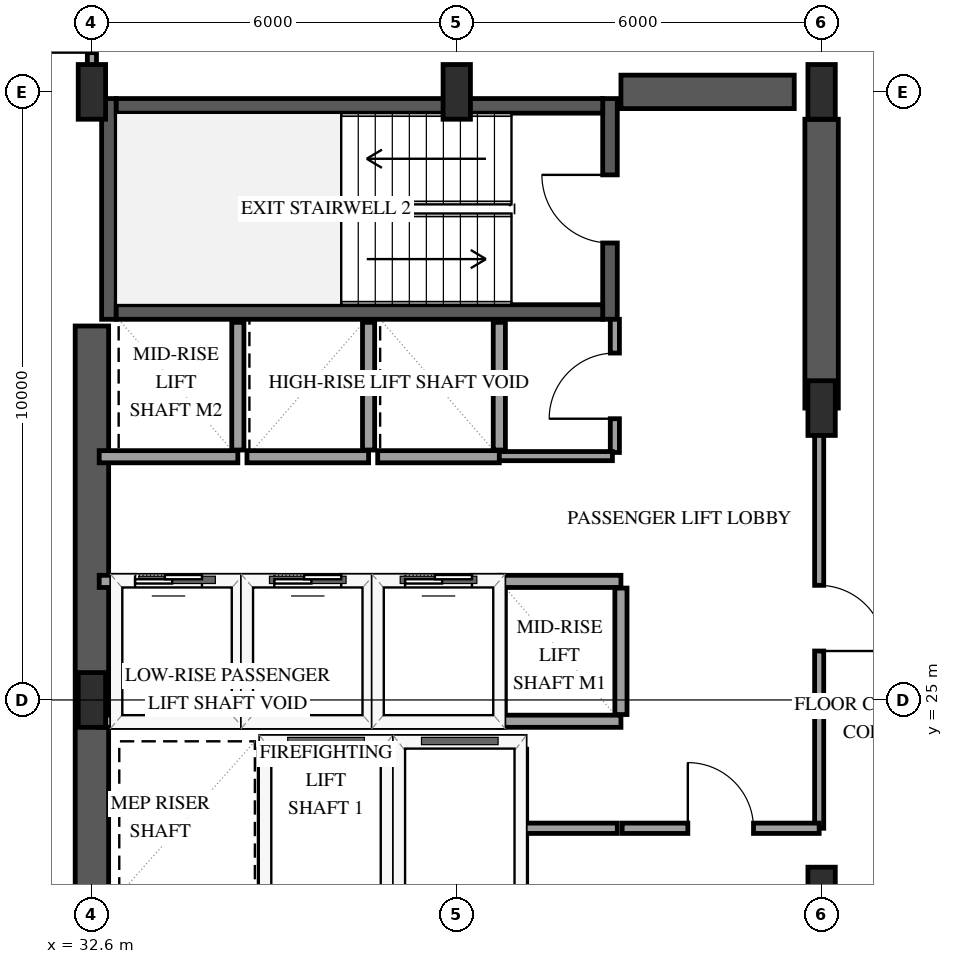
"""IFC4 building model, lengths in metres.
Left out: names, types, materials, properties, quantities, classifications, styles, units other than length and angle.
Written with IfcOpenShell. Run it as: python <this file> out.ifc"""

import sys

from ifc_helpers import new_model, si_unit, direction, frame, frame_2d, origin, origin_2d, place, context, subcontext, project, spatial, rectangle, extrude, element, fill, save


model = new_model("IFC4")
c1 = context("Model", 3, precision=1e-05, world=origin(), true_north=direction((0.0, 1.0)))
c2 = subcontext(c1, "Body", "Model", "MODEL_VIEW")
j1 = project(units=[si_unit("LENGTHUNIT", "METRE"), si_unit("PLANEANGLEUNIT", "RADIAN")], contexts=[c1])
p1 = place(None, origin())
s1 = spatial("IfcSite", under=j1, at=p1, CompositionType="ELEMENT")
p2 = place(p1, origin())
s2 = spatial("IfcBuilding", under=s1, at=p2, CompositionType="ELEMENT")
p3 = place(p2, frame((0.0, 0.0, 87.4)))
s3 = spatial("IfcBuildingStorey", under=s2, at=p3, CompositionType="ELEMENT", Elevation=87.4)
p4 = place(p3, frame((32.88, 31.26, 0.0), z_axis=(0.0, 0.0, 1.0), x_axis=(0.0, 1.0, 0.0)))
e1 = element("IfcWall", 1, at=p4, inside=s3, PredefinedType="SHEAR", context=c2, shape_type="SweptSolid", body=[
    extrude(rectangle(XDim=3.63, YDim=0.24, at=frame_2d((1.815, 0.0))), origin(), (0.0, 0.0, 1.0), 3.9),
])
p5 = place(p3, frame((41.12, 31.26, 0.0), z_axis=(0.0, 0.0, 1.0), x_axis=(0.0, 1.0, 0.0)))
e2 = element("IfcWall", 2, at=p5, inside=s3, PredefinedType="SHEAR", context=c2, shape_type="SweptSolid", body=[
    extrude(rectangle(XDim=3.63, YDim=0.24, at=frame_2d((1.815, 0.0))), origin(), (0.0, 0.0, 1.0), 3.9),
])
p6 = place(p5, frame((1.255, 0.0, 0.0)))
e3 = element("IfcOpeningElement", 3, at=p6, cuts=e2, PredefinedType="OPENING", context=c2, shape_type="SweptSolid", body=[
    extrude(rectangle(XDim=1.12, YDim=2.15, at=frame_2d((0.56, 1.075))), frame((0.0, 0.13, 0.0), z_axis=(0.0, -1.0, 0.0), x_axis=(1.0, 0.0, 0.0)), (0.0, 0.0, 1.0), 0.26),
])
for number, where, z_axis, x_axis in (
    (4, (33.0, 31.38, 0.0), (0.0, 0.0, 1.0), (1.0, 0.0, 0.0)),
    (5, (33.0, 34.77, 0.0), (0.0, 0.0, 1.0), (1.0, 0.0, 0.0)),
):
    element("IfcWall", number, at=place(p3, frame(where, z_axis=z_axis, x_axis=x_axis)), inside=s3, PredefinedType="SHEAR", context=c2, shape_type="SweptSolid", body=[
        extrude(rectangle(XDim=8.0, YDim=0.24, at=frame_2d((4.0, 0.0))), origin(), (0.0, 0.0, 1.0), 3.9),
    ])
p7 = place(p3, frame((32.6, 18.85, 0.0), z_axis=(0.0, 0.0, 1.0), x_axis=(0.0, 1.0, 0.0)))
e6 = element("IfcWall", 6, at=p7, inside=s3, PredefinedType="SHEAR", context=c2, shape_type="SweptSolid", body=[
    extrude(rectangle(XDim=12.3, YDim=0.55, at=frame_2d((6.15, 0.0))), origin(), (0.0, 0.0, 1.0), 3.9),
])
p8 = place(p3, frame((41.3, 35.0, 0.0), z_axis=(0.0, 0.0, 1.0), x_axis=(1.0, 0.0, 0.0)))
e7 = element("IfcWall", 7, at=p8, inside=s3, PredefinedType="SHEAR", context=c2, shape_type="SweptSolid", body=[
    extrude(rectangle(XDim=2.85, YDim=0.55, at=frame_2d((1.425, 0.0))), origin(), (0.0, 0.0, 1.0), 3.9),
])
p9 = place(p3, frame((44.6, 29.8, 0.0), z_axis=(0.0, 0.0, 1.0), x_axis=(0.0, 1.0, 0.0)))
e8 = element("IfcWall", 8, at=p9, inside=s3, PredefinedType="SHEAR", context=c2, shape_type="SweptSolid", body=[
    extrude(rectangle(XDim=4.75, YDim=0.55, at=frame_2d((2.375, 0.0))), origin(), (0.0, 0.0, 1.0), 3.9),
])
for number, where, z_axis, x_axis in (
    (9, (32.6, 25.0, -0.3), (0.0, 0.0, 1.0), (1.0, 0.0, 0.0)),
    (10, (32.6, 35.0, -0.3), (0.0, 0.0, 1.0), (1.0, 0.0, 0.0)),
    (11, (38.6, 35.0, -0.3), (0.0, 0.0, 1.0), (1.0, 0.0, 0.0)),
    (12, (44.6, 21.8, -0.3), (0.0, 0.0, 1.0), (1.0, 0.0, 0.0)),
    (13, (44.6, 29.8, -0.3), (0.0, 0.0, 1.0), (1.0, 0.0, 0.0)),
    (14, (44.6, 35.0, -0.3), (0.0, 0.0, 1.0), (1.0, 0.0, 0.0)),
):
    element("IfcColumn", number, at=place(p3, frame(where, z_axis=z_axis, x_axis=x_axis)), inside=s3, PredefinedType="PILASTER", context=c2, shape_type="SweptSolid", body=[
        extrude(rectangle(XDim=0.45, YDim=0.9, at=origin_2d()), origin(), (0.0, 0.0, 1.0), 4.2),
    ])
p10 = place(p3, frame((35.45, 24.3, 0.0), z_axis=(0.0, 0.0, 1.0), x_axis=(1.0, 0.0, 0.0)))
e15 = element("IfcWall", 15, at=p10, inside=s3, PredefinedType="SOLIDWALL", context=c2, shape_type="SweptSolid", body=[
    extrude(rectangle(XDim=2.0, YDim=0.2, at=frame_2d((1.0, 0.0))), origin(), (0.0, 0.0, 1.0), 3.6),
])
for number, where, z_axis, x_axis in (
    (16, (35.45, 21.81, 0.0), (0.0, 0.0, 1.0), (0.0, 1.0, 0.0)),
    (17, (37.45, 21.81, 0.0), (0.0, 0.0, 1.0), (0.0, 1.0, 0.0)),
):
    element("IfcWall", number, at=place(p3, frame(where, z_axis=z_axis, x_axis=x_axis)), inside=s3, PredefinedType="SOLIDWALL", context=c2, shape_type="SweptSolid", body=[
        extrude(rectangle(XDim=2.38, YDim=0.2, at=frame_2d((1.19, 0.0))), origin(), (0.0, 0.0, 1.0), 3.6),
    ])
p11 = place(p3, frame((37.65, 24.3, 0.0), z_axis=(0.0, 0.0, 1.0), x_axis=(1.0, 0.0, 0.0)))
e18 = element("IfcWall", 18, at=p11, inside=s3, PredefinedType="SOLIDWALL", context=c2, shape_type="SweptSolid", body=[
    extrude(rectangle(XDim=2.0, YDim=0.2, at=frame_2d((1.0, 0.0))), origin(), (0.0, 0.0, 1.0), 3.6),
])
p12 = place(p3, frame((39.65, 21.81, 0.0), z_axis=(0.0, 0.0, 1.0), x_axis=(0.0, 1.0, 0.0)))
e19 = element("IfcWall", 19, at=p12, inside=s3, PredefinedType="SOLIDWALL", context=c2, shape_type="SweptSolid", body=[
    extrude(rectangle(XDim=2.38, YDim=0.2, at=frame_2d((1.19, 0.0))), origin(), (0.0, 0.0, 1.0), 3.6),
])
p13 = place(p3, frame((32.72, 24.65, 0.0), z_axis=(0.0, 0.0, 1.0), x_axis=(1.0, 0.0, 0.0)))
e20 = element("IfcWall", 20, at=p13, inside=s3, PredefinedType="SOLIDWALL", context=c2, shape_type="SweptSolid", body=[
    extrude(rectangle(XDim=2.28, YDim=0.2, at=frame_2d((1.14, 0.0))), origin(), (0.0, 0.0, 1.0), 3.6),
])
p14 = place(p3, frame((32.72, 26.95, 0.0), z_axis=(0.0, 0.0, 1.0), x_axis=(1.0, 0.0, 0.0)))
e21 = element("IfcWall", 21, at=p14, inside=s3, PredefinedType="SOLIDWALL", context=c2, shape_type="SweptSolid", body=[
    extrude(rectangle(XDim=2.28, YDim=0.2, at=frame_2d((1.14, 0.0))), origin(), (0.0, 0.0, 1.0), 2.974),
])
p15 = place(p14, frame((0.59, 0.0, 0.0)))
e22 = element("IfcOpeningElement", 22, at=p15, cuts=e21, PredefinedType="OPENING", context=c2, shape_type="SweptSolid", body=[
    extrude(rectangle(XDim=1.1, YDim=2.15, at=frame_2d((0.55, 1.075))), frame((0.0, 0.11, 0.0), z_axis=(0.0, -1.0, 0.0), x_axis=(1.0, 0.0, 0.0)), (0.0, 0.0, 1.0), 0.22),
])
p16 = place(p3, frame((35.0, 24.76, 0.0), z_axis=(0.0, 0.0, 1.0), x_axis=(0.0, 1.0, 0.0)))
e23 = element("IfcWall", 23, at=p16, inside=s3, PredefinedType="SOLIDWALL", context=c2, shape_type="SweptSolid", body=[
    extrude(rectangle(XDim=2.08, YDim=0.2, at=frame_2d((1.04, 0.0))), origin(), (0.0, 0.0, 1.0), 3.6),
])
p17 = place(p3, frame((35.15, 24.65, 0.0), z_axis=(0.0, 0.0, 1.0), x_axis=(1.0, 0.0, 0.0)))
e24 = element("IfcWall", 24, at=p17, inside=s3, PredefinedType="SOLIDWALL", context=c2, shape_type="SweptSolid", body=[
    extrude(rectangle(XDim=2.0, YDim=0.2, at=frame_2d((1.0, 0.0))), origin(), (0.0, 0.0, 1.0), 3.6),
])
p18 = place(p3, frame((35.15, 26.95, 0.0), z_axis=(0.0, 0.0, 1.0), x_axis=(1.0, 0.0, 0.0)))
e25 = element("IfcWall", 25, at=p18, inside=s3, PredefinedType="SOLIDWALL", context=c2, shape_type="SweptSolid", body=[
    extrude(rectangle(XDim=2.0, YDim=0.2, at=frame_2d((1.0, 0.0))), origin(), (0.0, 0.0, 1.0), 2.974),
])
p19 = place(p18, frame((0.45, 0.0, 0.0)))
e26 = element("IfcOpeningElement", 26, at=p19, cuts=e25, PredefinedType="OPENING", context=c2, shape_type="SweptSolid", body=[
    extrude(rectangle(XDim=1.1, YDim=2.15, at=frame_2d((0.55, 1.075))), frame((0.0, 0.11, 0.0), z_axis=(0.0, -1.0, 0.0), x_axis=(1.0, 0.0, 0.0)), (0.0, 0.0, 1.0), 0.22),
])
p20 = place(p3, frame((37.15, 24.76, 0.0), z_axis=(0.0, 0.0, 1.0), x_axis=(0.0, 1.0, 0.0)))
e27 = element("IfcWall", 27, at=p20, inside=s3, PredefinedType="SOLIDWALL", context=c2, shape_type="SweptSolid", body=[
    extrude(rectangle(XDim=2.08, YDim=0.2, at=frame_2d((1.04, 0.0))), origin(), (0.0, 0.0, 1.0), 3.6),
])
p21 = place(p3, frame((37.3, 24.65, 0.0), z_axis=(0.0, 0.0, 1.0), x_axis=(1.0, 0.0, 0.0)))
e28 = element("IfcWall", 28, at=p21, inside=s3, PredefinedType="SOLIDWALL", context=c2, shape_type="SweptSolid", body=[
    extrude(rectangle(XDim=2.0, YDim=0.2, at=frame_2d((1.0, 0.0))), origin(), (0.0, 0.0, 1.0), 3.6),
])
p22 = place(p3, frame((37.3, 26.95, 0.0), z_axis=(0.0, 0.0, 1.0), x_axis=(1.0, 0.0, 0.0)))
e29 = element("IfcWall", 29, at=p22, inside=s3, PredefinedType="SOLIDWALL", context=c2, shape_type="SweptSolid", body=[
    extrude(rectangle(XDim=2.0, YDim=0.2, at=frame_2d((1.0, 0.0))), origin(), (0.0, 0.0, 1.0), 2.974),
])
p23 = place(p22, frame((0.45, 0.0, 0.0)))
e30 = element("IfcOpeningElement", 30, at=p23, cuts=e29, PredefinedType="OPENING", context=c2, shape_type="SweptSolid", body=[
    extrude(rectangle(XDim=1.1, YDim=2.15, at=frame_2d((0.55, 1.075))), frame((0.0, 0.11, 0.0), z_axis=(0.0, -1.0, 0.0), x_axis=(1.0, 0.0, 0.0)), (0.0, 0.0, 1.0), 0.22),
])
p24 = place(p3, frame((39.3, 24.76, 0.0), z_axis=(0.0, 0.0, 1.0), x_axis=(0.0, 1.0, 0.0)))
e31 = element("IfcWall", 31, at=p24, inside=s3, PredefinedType="SOLIDWALL", context=c2, shape_type="SweptSolid", body=[
    extrude(rectangle(XDim=2.08, YDim=0.2, at=frame_2d((1.04, 0.0))), origin(), (0.0, 0.0, 1.0), 3.6),
])
p25 = place(p3, frame((39.3, 24.65, 0.0), z_axis=(0.0, 0.0, 1.0), x_axis=(1.0, 0.0, 0.0)))
e32 = element("IfcWall", 32, at=p25, inside=s3, PredefinedType="SOLIDWALL", context=c2, shape_type="SweptSolid", body=[
    extrude(rectangle(XDim=2.0, YDim=0.2, at=frame_2d((1.0, 0.0))), origin(), (0.0, 0.0, 1.0), 3.6),
])
p26 = place(p3, frame((39.3, 26.95, 0.0), z_axis=(0.0, 0.0, 1.0), x_axis=(1.0, 0.0, 0.0)))
e33 = element("IfcWall", 33, at=p26, inside=s3, PredefinedType="SOLIDWALL", context=c2, shape_type="SweptSolid", body=[
    extrude(rectangle(XDim=2.0, YDim=0.2, at=frame_2d((1.0, 0.0))), origin(), (0.0, 0.0, 1.0), 2.974),
])
p27 = place(p3, frame((41.3, 24.76, 0.0), z_axis=(0.0, 0.0, 1.0), x_axis=(0.0, 1.0, 0.0)))
e34 = element("IfcWall", 34, at=p27, inside=s3, PredefinedType="SOLIDWALL", context=c2, shape_type="SweptSolid", body=[
    extrude(rectangle(XDim=2.08, YDim=0.2, at=frame_2d((1.04, 0.0))), origin(), (0.0, 0.0, 1.0), 3.6),
])
p28 = place(p3, frame((32.72, 29.0, 0.0), z_axis=(0.0, 0.0, 1.0), x_axis=(1.0, 0.0, 0.0)))
e35 = element("IfcWall", 35, at=p28, inside=s3, PredefinedType="SOLIDWALL", context=c2, shape_type="SweptSolid", body=[
    extrude(rectangle(XDim=2.28, YDim=0.2, at=frame_2d((1.14, 0.0))), origin(), (0.0, 0.0, 1.0), 3.6),
])
p29 = place(p3, frame((35.0, 29.11, 0.0), z_axis=(0.0, 0.0, 1.0), x_axis=(0.0, 1.0, 0.0)))
e36 = element("IfcWall", 36, at=p29, inside=s3, PredefinedType="SOLIDWALL", context=c2, shape_type="SweptSolid", body=[
    extrude(rectangle(XDim=2.1, YDim=0.2, at=frame_2d((1.05, 0.0))), origin(), (0.0, 0.0, 1.0), 3.6),
])
p30 = place(p3, frame((35.15, 29.0, 0.0), z_axis=(0.0, 0.0, 1.0), x_axis=(1.0, 0.0, 0.0)))
e37 = element("IfcWall", 37, at=p30, inside=s3, PredefinedType="SOLIDWALL", context=c2, shape_type="SweptSolid", body=[
    extrude(rectangle(XDim=2.0, YDim=0.2, at=frame_2d((1.0, 0.0))), origin(), (0.0, 0.0, 1.0), 3.6),
])
p31 = place(p3, frame((37.15, 29.11, 0.0), z_axis=(0.0, 0.0, 1.0), x_axis=(0.0, 1.0, 0.0)))
e38 = element("IfcWall", 38, at=p31, inside=s3, PredefinedType="SOLIDWALL", context=c2, shape_type="SweptSolid", body=[
    extrude(rectangle(XDim=2.1, YDim=0.2, at=frame_2d((1.05, 0.0))), origin(), (0.0, 0.0, 1.0), 3.6),
])
p32 = place(p3, frame((37.3, 29.0, 0.0), z_axis=(0.0, 0.0, 1.0), x_axis=(1.0, 0.0, 0.0)))
e39 = element("IfcWall", 39, at=p32, inside=s3, PredefinedType="SOLIDWALL", context=c2, shape_type="SweptSolid", body=[
    extrude(rectangle(XDim=2.0, YDim=0.2, at=frame_2d((1.0, 0.0))), origin(), (0.0, 0.0, 1.0), 3.6),
])
p33 = place(p3, frame((39.3, 29.11, 0.0), z_axis=(0.0, 0.0, 1.0), x_axis=(0.0, 1.0, 0.0)))
e40 = element("IfcWall", 40, at=p33, inside=s3, PredefinedType="SOLIDWALL", context=c2, shape_type="SweptSolid", body=[
    extrude(rectangle(XDim=2.1, YDim=0.2, at=frame_2d((1.05, 0.0))), origin(), (0.0, 0.0, 1.0), 3.6),
])
p34 = place(p3, frame((44.56, 29.8, 0.0), z_axis=(0.0, 0.0, 1.0), x_axis=(0.0, -1.0, 0.0)))
e41 = element("IfcWall", 41, at=p34, inside=s3, PredefinedType="PARTITIONING", context=c2, shape_type="SweptSolid", body=[
    extrude(rectangle(XDim=6.91, YDim=0.15, at=frame_2d((3.455, 0.0))), origin(), (0.0, 0.0, 1.0), 2.64),
])
p35 = place(p34, frame((2.915, 0.0, 0.0)))
e42 = element("IfcOpeningElement", 42, at=p35, cuts=e41, PredefinedType="OPENING", context=c2, shape_type="SweptSolid", body=[
    extrude(rectangle(XDim=1.08, YDim=2.15, at=frame_2d((0.54, 1.075))), frame((0.0, 0.085, 0.0), z_axis=(0.0, -1.0, 0.0), x_axis=(1.0, 0.0, 0.0)), (0.0, 0.0, 1.0), 0.17),
])
p36 = place(p3, frame((41.32, 22.89, 0.0), z_axis=(0.0, 0.0, 1.0), x_axis=(1.0, 0.0, 0.0)))
e43 = element("IfcWall", 43, at=p36, inside=s3, PredefinedType="PARTITIONING", context=c2, shape_type="SweptSolid", body=[
    extrude(rectangle(XDim=3.24, YDim=0.17, at=frame_2d((1.62, 0.0))), origin(), (0.0, 0.0, 1.0), 3.6),
])
p37 = place(p36, frame((1.08, 0.0, 0.0)))
e44 = element("IfcOpeningElement", 44, at=p37, cuts=e43, PredefinedType="OPENING", context=c2, shape_type="SweptSolid", body=[
    extrude(rectangle(XDim=1.08, YDim=2.15, at=frame_2d((0.54, 1.075))), frame((0.0, 0.095, 0.0), z_axis=(0.0, -1.0, 0.0), x_axis=(1.0, 0.0, 0.0)), (0.0, 0.0, 1.0), 0.19),
])
p38 = place(p3, frame((41.2, 29.07, 0.0), z_axis=(0.0, 0.0, 1.0), x_axis=(0.0, 1.0, 0.0)))
e45 = element("IfcWall", 45, at=p38, inside=s3, PredefinedType="PARTITIONING", context=c2, shape_type="SweptSolid", body=[
    extrude(rectangle(XDim=2.19, YDim=0.15, at=frame_2d((1.095, 0.0))), origin(), (0.0, 0.0, 1.0), 3.6),
])
p39 = place(p38, frame((0.555, 0.0, 0.0)))
e46 = element("IfcOpeningElement", 46, at=p39, cuts=e45, PredefinedType="OPENING", context=c2, shape_type="SweptSolid", body=[
    extrude(rectangle(XDim=1.08, YDim=2.15, at=frame_2d((0.54, 1.075))), frame((0.0, 0.085, 0.0), z_axis=(0.0, -1.0, 0.0), x_axis=(1.0, 0.0, 0.0)), (0.0, 0.0, 1.0), 0.17),
])
p40 = place(p3, frame((32.6, 35.07, 0.0), z_axis=(0.0, 0.0, 1.0), x_axis=(0.0, 1.0, 0.0)))
e47 = element("IfcWall", 47, at=p40, inside=s3, PredefinedType="PARTITIONING", context=c2, shape_type="SweptSolid", body=[
    extrude(rectangle(XDim=1.91, YDim=0.15, at=frame_2d((0.955, 0.0))), origin(), (0.0, 0.0, 1.0), 3.6),
])
p41 = place(p40, frame((0.575, 0.0, 0.0)))
e48 = element("IfcOpeningElement", 48, at=p41, cuts=e47, PredefinedType="OPENING", context=c2, shape_type="SweptSolid", body=[
    extrude(rectangle(XDim=0.92, YDim=2.12, at=frame_2d((0.46, 1.06))), frame((0.0, 0.085, 0.0), z_axis=(0.0, -1.0, 0.0), x_axis=(1.0, 0.0, 0.0)), (0.0, 0.0, 1.0), 0.17),
])
p42 = place(p3, frame((39.3, 29.01, 0.0), z_axis=(0.0, 0.0, 1.0), x_axis=(1.0, 0.0, 0.0)))
e49 = element("IfcWall", 49, at=p42, inside=s3, PredefinedType="PARTITIONING", context=c2, shape_type="SweptSolid", body=[
    extrude(rectangle(XDim=1.86, YDim=0.15, at=frame_2d((0.93, 0.0))), origin(), (0.0, 0.0, 1.0), 3.6),
])
p43 = place(p3, frame((39.72, 22.89, 0.0), z_axis=(0.0, 0.0, 1.0), x_axis=(1.0, 0.0, 0.0)))
e50 = element("IfcWall", 50, at=p43, inside=s3, PredefinedType="PARTITIONING", context=c2, shape_type="SweptSolid", body=[
    extrude(rectangle(XDim=1.52, YDim=0.17, at=frame_2d((0.76, 0.0))), origin(), (0.0, 0.0, 1.0), 3.6),
])
p44 = place(p15, origin())
e51 = element("IfcDoor", 51, at=p44, inside=s3, OperationType="SLIDING_TO_LEFT", PredefinedType="DOOR", context=c2, shape_type="SweptSolid", body=[
    extrude(rectangle(XDim=1.1, YDim=2.15, at=frame_2d((0.55, 1.075))), frame((0.0, 0.025, 0.0), z_axis=(0.0, -1.0, 0.0), x_axis=(1.0, 0.0, 0.0)), (0.0, 0.0, 1.0), 0.05),
])
fill(e22, e51)
p45 = place(p19, origin())
e52 = element("IfcDoor", 52, at=p45, inside=s3, OperationType="SLIDING_TO_LEFT", PredefinedType="DOOR", context=c2, shape_type="SweptSolid", body=[
    extrude(rectangle(XDim=1.1, YDim=2.15, at=frame_2d((0.55, 1.075))), frame((0.0, 0.025, 0.0), z_axis=(0.0, -1.0, 0.0), x_axis=(1.0, 0.0, 0.0)), (0.0, 0.0, 1.0), 0.05),
])
fill(e26, e52)
p46 = place(p23, origin())
e53 = element("IfcDoor", 53, at=p46, inside=s3, OperationType="SLIDING_TO_LEFT", PredefinedType="DOOR", context=c2, shape_type="SweptSolid", body=[
    extrude(rectangle(XDim=1.1, YDim=2.15, at=frame_2d((0.55, 1.075))), frame((0.0, 0.025, 0.0), z_axis=(0.0, -1.0, 0.0), x_axis=(1.0, 0.0, 0.0)), (0.0, 0.0, 1.0), 0.05),
])
fill(e30, e53)
p47 = place(p6, origin())
e54 = element("IfcDoor", 54, at=p47, inside=s3, OperationType="SINGLE_SWING_RIGHT", PredefinedType="DOOR", context=c2, shape_type="SweptSolid", body=[
    extrude(rectangle(XDim=1.12, YDim=2.15, at=frame_2d((0.56, 1.075))), frame((0.0, 0.025, 0.0), z_axis=(0.0, -1.0, 0.0), x_axis=(1.0, 0.0, 0.0)), (0.0, 0.0, 1.0), 0.05),
])
fill(e3, e54)
p48 = place(p35, origin())
e55 = element("IfcDoor", 55, at=p48, inside=s3, OperationType="SINGLE_SWING_RIGHT", PredefinedType="DOOR", context=c2, shape_type="SweptSolid", body=[
    extrude(rectangle(XDim=1.08, YDim=2.15, at=frame_2d((0.54, 1.075))), frame((0.0, 0.025, 0.0), z_axis=(0.0, -1.0, 0.0), x_axis=(1.0, 0.0, 0.0)), (0.0, 0.0, 1.0), 0.05),
])
fill(e42, e55)
p49 = place(p37, origin())
e56 = element("IfcDoor", 56, at=p49, inside=s3, OperationType="SINGLE_SWING_LEFT", PredefinedType="DOOR", context=c2, shape_type="SweptSolid", body=[
    extrude(rectangle(XDim=1.08, YDim=2.15, at=frame_2d((0.54, 1.075))), frame((0.0, 0.025, 0.0), z_axis=(0.0, -1.0, 0.0), x_axis=(1.0, 0.0, 0.0)), (0.0, 0.0, 1.0), 0.05),
])
fill(e44, e56)
p50 = place(p39, origin())
e57 = element("IfcDoor", 57, at=p50, inside=s3, OperationType="SINGLE_SWING_LEFT", PredefinedType="DOOR", context=c2, shape_type="SweptSolid", body=[
    extrude(rectangle(XDim=1.08, YDim=2.15, at=frame_2d((0.54, 1.075))), frame((0.0, 0.025, 0.0), z_axis=(0.0, -1.0, 0.0), x_axis=(1.0, 0.0, 0.0)), (0.0, 0.0, 1.0), 0.05),
])
fill(e46, e57)
p51 = place(p41, origin())
e58 = element("IfcDoor", 58, at=p51, inside=s3, OperationType="SINGLE_SWING_LEFT", PredefinedType="DOOR", context=c2, shape_type="SweptSolid", body=[
    extrude(rectangle(XDim=0.92, YDim=2.12, at=frame_2d((0.46, 1.06))), frame((0.0, 0.025, 0.0), z_axis=(0.0, -1.0, 0.0), x_axis=(1.0, 0.0, 0.0)), (0.0, 0.0, 1.0), 0.05),
])
fill(e48, e58)
save(model, sys.argv[1])
